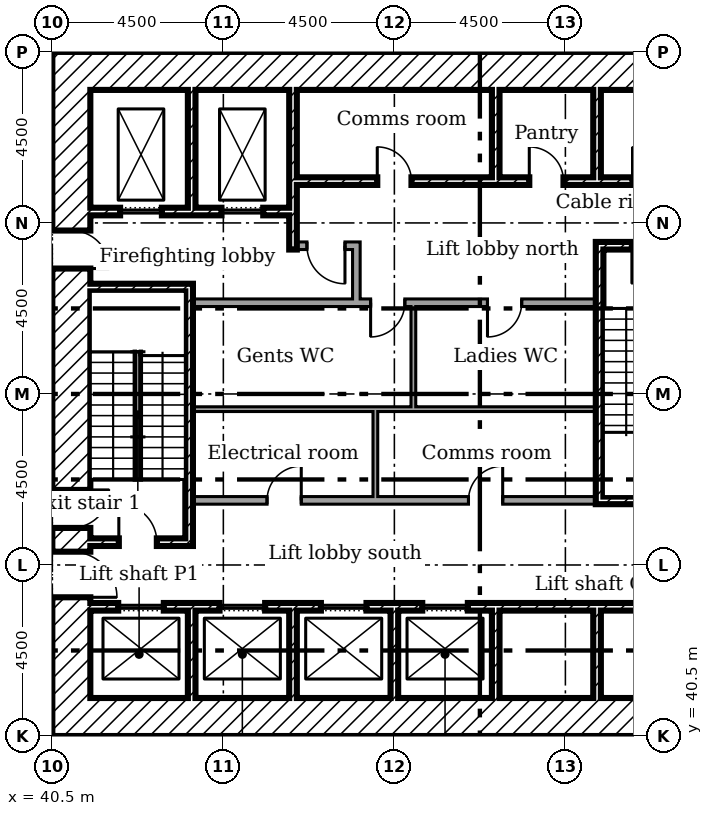
"""IFC4 building model, lengths in metres.
Left out: names, types, materials, properties, quantities, classifications, styles, units other than length and angle.
Written with IfcOpenShell. Run it as: python <this file> out.ifc"""

import sys

from ifc_helpers import new_model, si_unit, direction, frame, frame_2d, origin, place, context, subcontext, project, spatial, rectangle, extrude, element, fill, save


model = new_model("IFC4")
c1 = context("Model", 3, precision=1e-05, world=origin(), true_north=direction((0.0, 1.0)))
c2 = subcontext(c1, "Body", "Model", "MODEL_VIEW")
j1 = project(units=[si_unit("LENGTHUNIT", "METRE"), si_unit("PLANEANGLEUNIT", "RADIAN")], contexts=[c1])
p1 = place(None, origin())
s1 = spatial("IfcSite", under=j1, at=p1, CompositionType="ELEMENT")
p2 = place(p1, origin())
s2 = spatial("IfcBuilding", under=s1, at=p2, CompositionType="ELEMENT")
p3 = place(p2, frame((0.0, 0.0, 16.5)))
s3 = spatial("IfcBuildingStorey", under=s2, at=p3, CompositionType="ELEMENT", Elevation=16.5)
for number, where in (
    (1, (41.5, 58.0, 0.0)),
    (2, (41.5, 41.0, 0.0)),
):
    element("IfcWall", number, at=place(p3, frame(where)), inside=s3, PredefinedType="SHEAR", context=c2, shape_type="SweptSolid", body=[
        extrude(rectangle(XDim=16.0, YDim=1.0, at=frame_2d((8.0, 0.0))), origin(), (0.0, 0.0, 1.0), 4.0),
    ])
p4 = place(p3, frame((41.0, 40.5, 0.0), z_axis=(0.0, 0.0, 1.0), x_axis=(0.0, 1.0, 0.0)))
e3 = element("IfcWall", 3, at=p4, inside=s3, PredefinedType="SHEAR", context=c2, shape_type="SweptSolid", body=[
    extrude(rectangle(XDim=18.0, YDim=1.0, at=frame_2d((9.0, 0.0))), origin(), (0.0, 0.0, 1.0), 4.0),
])
p5 = place(p4, frame((3.65, 0.0, 0.0)))
e4 = element("IfcOpeningElement", 4, at=p5, cuts=e3, PredefinedType="OPENING", context=c2, shape_type="SweptSolid", body=[
    extrude(rectangle(XDim=1.2, YDim=2.1, at=frame_2d((0.6, 1.05))), frame((0.0, 0.51, 0.0), z_axis=(0.0, -1.0, 0.0), x_axis=(1.0, 0.0, 0.0)), (0.0, 0.0, 1.0), 1.02),
])
p6 = place(p4, frame((5.475, 0.0, 0.0)))
e5 = element("IfcOpeningElement", 5, at=p6, cuts=e3, PredefinedType="OPENING", context=c2, shape_type="SweptSolid", body=[
    extrude(rectangle(XDim=1.0, YDim=2.1, at=frame_2d((0.5, 1.05))), frame((0.0, 0.51, 0.0), z_axis=(0.0, -1.0, 0.0), x_axis=(1.0, 0.0, 0.0)), (0.0, 0.0, 1.0), 1.02),
])
p7 = place(p4, frame((12.3, 0.0, 0.0)))
e6 = element("IfcOpeningElement", 6, at=p7, cuts=e3, PredefinedType="OPENING", context=c2, shape_type="SweptSolid", body=[
    extrude(rectangle(XDim=1.0, YDim=2.1, at=frame_2d((0.5, 1.05))), frame((0.0, 0.51, 0.0), z_axis=(0.0, -1.0, 0.0), x_axis=(1.0, 0.0, 0.0)), (0.0, 0.0, 1.0), 1.02),
])
p8 = place(p3, frame((44.167, 57.5, 0.0), z_axis=(0.0, 0.0, 1.0), x_axis=(0.0, -1.0, 0.0)))
e7 = element("IfcWall", 7, at=p8, inside=s3, PredefinedType="SHEAR", context=c2, shape_type="SweptSolid", body=[
    extrude(rectangle(XDim=3.1, YDim=0.2, at=frame_2d((1.55, 0.0))), origin(), (0.0, 0.0, 1.0), 4.0),
])
p9 = place(p3, frame((46.833, 57.5, 0.0), z_axis=(0.0, 0.0, 1.0), x_axis=(0.0, -1.0, 0.0)))
e8 = element("IfcWall", 8, at=p9, inside=s3, PredefinedType="SHEAR", context=c2, shape_type="SweptSolid", body=[
    extrude(rectangle(XDim=4.2, YDim=0.2, at=frame_2d((2.1, 0.0))), origin(), (0.0, 0.0, 1.0), 4.0),
])
for number, where, z_axis, x_axis in (
    (9, (52.167, 57.5, 0.0), (0.0, 0.0, 1.0), (0.0, -1.0, 0.0)),
    (10, (54.833, 57.5, 0.0), (0.0, 0.0, 1.0), (0.0, -1.0, 0.0)),
    (11, (44.167, 41.5, 0.0), (0.0, 0.0, 1.0), (0.0, 1.0, 0.0)),
    (12, (46.833, 41.5, 0.0), (0.0, 0.0, 1.0), (0.0, 1.0, 0.0)),
    (13, (49.5, 41.5, 0.0), (0.0, 0.0, 1.0), (0.0, 1.0, 0.0)),
    (14, (52.167, 41.5, 0.0), (0.0, 0.0, 1.0), (0.0, 1.0, 0.0)),
    (15, (54.833, 41.5, 0.0), (0.0, 0.0, 1.0), (0.0, 1.0, 0.0)),
):
    element("IfcWall", number, at=place(p3, frame(where, z_axis=z_axis, x_axis=x_axis)), inside=s3, PredefinedType="SHEAR", context=c2, shape_type="SweptSolid", body=[
        extrude(rectangle(XDim=2.3, YDim=0.2, at=frame_2d((1.15, 0.0))), origin(), (0.0, 0.0, 1.0), 4.0),
    ])
p10 = place(p3, frame((48.5, 51.9, 0.0), z_axis=(0.0, 0.0, 1.0), x_axis=(0.0, 1.0, 0.0)))
e16 = element("IfcWall", 16, at=p10, inside=s3, PredefinedType="PARTITIONING", context=c2, shape_type="SweptSolid", body=[
    extrude(rectangle(XDim=1.6, YDim=0.2, at=frame_2d((0.8, 0.0))), origin(), (0.0, 0.0, 1.0), 4.0),
])
p11 = place(p3, frame((46.933, 53.4, 0.0)))
e17 = element("IfcWall", 17, at=p11, inside=s3, PredefinedType="PARTITIONING", context=c2, shape_type="SweptSolid", body=[
    extrude(rectangle(XDim=1.467, YDim=0.2, at=frame_2d((0.733, 0.0))), origin(), (0.0, 0.0, 1.0), 4.0),
])
p12 = place(p11, frame((0.267, 0.0, 0.0)))
e18 = element("IfcOpeningElement", 18, at=p12, cuts=e17, PredefinedType="OPENING", context=c2, shape_type="SweptSolid", body=[
    extrude(rectangle(XDim=1.0, YDim=2.1, at=frame_2d((0.5, 1.05))), frame((0.0, 0.11, 0.0), z_axis=(0.0, -1.0, 0.0), x_axis=(1.0, 0.0, 0.0)), (0.0, 0.0, 1.0), 0.22),
])
p13 = place(p3, frame((46.933, 55.1, 0.0)))
e19 = element("IfcWall", 19, at=p13, inside=s3, PredefinedType="SHEAR", context=c2, shape_type="SweptSolid", body=[
    extrude(rectangle(XDim=10.567, YDim=0.2, at=frame_2d((5.283, 0.0))), origin(), (0.0, 0.0, 1.0), 4.0),
])
p14 = place(p13, frame((8.833, 0.0, 0.0)))
e20 = element("IfcOpeningElement", 20, at=p14, cuts=e19, PredefinedType="OPENING", context=c2, shape_type="SweptSolid", body=[
    extrude(rectangle(XDim=0.9, YDim=2.1, at=frame_2d((0.45, 1.05))), frame((0.0, 0.11, 0.0), z_axis=(0.0, -1.0, 0.0), x_axis=(1.0, 0.0, 0.0)), (0.0, 0.0, 1.0), 0.22),
])
p15 = place(p13, frame((2.117, 0.0, 0.0)))
e21 = element("IfcOpeningElement", 21, at=p15, cuts=e19, PredefinedType="OPENING", context=c2, shape_type="SweptSolid", body=[
    extrude(rectangle(XDim=0.9, YDim=2.1, at=frame_2d((0.45, 1.05))), frame((0.0, 0.11, 0.0), z_axis=(0.0, -1.0, 0.0), x_axis=(1.0, 0.0, 0.0)), (0.0, 0.0, 1.0), 0.22),
])
p16 = place(p13, frame((6.117, 0.0, 0.0)))
e22 = element("IfcOpeningElement", 22, at=p16, cuts=e19, PredefinedType="OPENING", context=c2, shape_type="SweptSolid", body=[
    extrude(rectangle(XDim=0.9, YDim=2.1, at=frame_2d((0.45, 1.05))), frame((0.0, 0.11, 0.0), z_axis=(0.0, -1.0, 0.0), x_axis=(1.0, 0.0, 0.0)), (0.0, 0.0, 1.0), 0.22),
])
p17 = place(p3, frame((41.5, 54.3, 0.0)))
e23 = element("IfcWall", 23, at=p17, inside=s3, PredefinedType="SHEAR", context=c2, shape_type="SweptSolid", body=[
    extrude(rectangle(XDim=5.233, YDim=0.2, at=frame_2d((2.617, 0.0))), origin(), (0.0, 0.0, 1.0), 4.0),
])
p18 = place(p17, frame((0.783, 0.0, 0.0)))
e24 = element("IfcOpeningElement", 24, at=p18, cuts=e23, PredefinedType="OPENING", context=c2, shape_type="SweptSolid", body=[
    extrude(rectangle(XDim=1.1, YDim=2.1, at=frame_2d((0.55, 1.05))), frame((0.0, 0.11, 0.0), z_axis=(0.0, -1.0, 0.0), x_axis=(1.0, 0.0, 0.0)), (0.0, 0.0, 1.0), 0.22),
])
p19 = place(p17, frame((3.45, 0.0, 0.0)))
e25 = element("IfcOpeningElement", 25, at=p19, cuts=e23, PredefinedType="OPENING", context=c2, shape_type="SweptSolid", body=[
    extrude(rectangle(XDim=1.1, YDim=2.1, at=frame_2d((0.55, 1.05))), frame((0.0, 0.11, 0.0), z_axis=(0.0, -1.0, 0.0), x_axis=(1.0, 0.0, 0.0)), (0.0, 0.0, 1.0), 0.22),
])
p20 = place(p3, frame((41.5, 43.9, 0.0)))
e26 = element("IfcWall", 26, at=p20, inside=s3, PredefinedType="SHEAR", context=c2, shape_type="SweptSolid", body=[
    extrude(rectangle(XDim=16.0, YDim=0.2, at=frame_2d((8.0, 0.0))), origin(), (0.0, 0.0, 1.0), 4.0),
])
p21 = place(p20, frame((0.733, 0.0, 0.0)))
e27 = element("IfcOpeningElement", 27, at=p21, cuts=e26, PredefinedType="OPENING", context=c2, shape_type="SweptSolid", body=[
    extrude(rectangle(XDim=1.2, YDim=2.1, at=frame_2d((0.6, 1.05))), frame((0.0, 0.11, 0.0), z_axis=(0.0, -1.0, 0.0), x_axis=(1.0, 0.0, 0.0)), (0.0, 0.0, 1.0), 0.22),
])
p22 = place(p20, frame((3.4, 0.0, 0.0)))
e28 = element("IfcOpeningElement", 28, at=p22, cuts=e26, PredefinedType="OPENING", context=c2, shape_type="SweptSolid", body=[
    extrude(rectangle(XDim=1.2, YDim=2.1, at=frame_2d((0.6, 1.05))), frame((0.0, 0.11, 0.0), z_axis=(0.0, -1.0, 0.0), x_axis=(1.0, 0.0, 0.0)), (0.0, 0.0, 1.0), 0.22),
])
p23 = place(p20, frame((6.067, 0.0, 0.0)))
e29 = element("IfcOpeningElement", 29, at=p23, cuts=e26, PredefinedType="OPENING", context=c2, shape_type="SweptSolid", body=[
    extrude(rectangle(XDim=1.2, YDim=2.1, at=frame_2d((0.6, 1.05))), frame((0.0, 0.11, 0.0), z_axis=(0.0, -1.0, 0.0), x_axis=(1.0, 0.0, 0.0)), (0.0, 0.0, 1.0), 0.22),
])
p24 = place(p20, frame((8.733, 0.0, 0.0)))
e30 = element("IfcOpeningElement", 30, at=p24, cuts=e26, PredefinedType="OPENING", context=c2, shape_type="SweptSolid", body=[
    extrude(rectangle(XDim=1.2, YDim=2.1, at=frame_2d((0.6, 1.05))), frame((0.0, 0.11, 0.0), z_axis=(0.0, -1.0, 0.0), x_axis=(1.0, 0.0, 0.0)), (0.0, 0.0, 1.0), 0.22),
])
p25 = place(p3, frame((44.1, 45.5, 0.0), z_axis=(0.0, 0.0, 1.0), x_axis=(0.0, 1.0, 0.0)))
e31 = element("IfcWall", 31, at=p25, inside=s3, PredefinedType="SHEAR", context=c2, shape_type="SweptSolid", body=[
    extrude(rectangle(XDim=6.9, YDim=0.2, at=frame_2d((3.45, 0.0))), origin(), (0.0, 0.0, 1.0), 4.0),
])
p26 = place(p3, frame((41.5, 52.3, 0.0)))
e32 = element("IfcWall", 32, at=p26, inside=s3, PredefinedType="SHEAR", context=c2, shape_type="SweptSolid", body=[
    extrude(rectangle(XDim=2.5, YDim=0.2, at=frame_2d((1.25, 0.0))), origin(), (0.0, 0.0, 1.0), 4.0),
])
p27 = place(p3, frame((41.5, 45.6, 0.0)))
e33 = element("IfcWall", 33, at=p27, inside=s3, PredefinedType="SHEAR", context=c2, shape_type="SweptSolid", body=[
    extrude(rectangle(XDim=2.5, YDim=0.2, at=frame_2d((1.25, 0.0))), origin(), (0.0, 0.0, 1.0), 4.0),
])
p28 = place(p27, frame((0.75, 0.0, 0.0)))
e34 = element("IfcOpeningElement", 34, at=p28, cuts=e33, PredefinedType="OPENING", context=c2, shape_type="SweptSolid", body=[
    extrude(rectangle(XDim=1.0, YDim=2.1, at=frame_2d((0.5, 1.05))), frame((0.0, 0.11, 0.0), z_axis=(0.0, -1.0, 0.0), x_axis=(1.0, 0.0, 0.0)), (0.0, 0.0, 1.0), 0.22),
])
p29 = place(p3, frame((54.8, 53.4, 0.0)))
e35 = element("IfcWall", 35, at=p29, inside=s3, PredefinedType="SHEAR", context=c2, shape_type="SweptSolid", body=[
    extrude(rectangle(XDim=2.7, YDim=0.2, at=frame_2d((1.35, 0.0))), origin(), (0.0, 0.0, 1.0), 4.0),
])
p30 = place(p29, frame((0.95, 0.0, 0.0)))
e36 = element("IfcOpeningElement", 36, at=p30, cuts=e35, PredefinedType="OPENING", context=c2, shape_type="SweptSolid", body=[
    extrude(rectangle(XDim=1.0, YDim=2.1, at=frame_2d((0.5, 1.05))), frame((0.0, 0.11, 0.0), z_axis=(0.0, -1.0, 0.0), x_axis=(1.0, 0.0, 0.0)), (0.0, 0.0, 1.0), 0.22),
])
p31 = place(p3, frame((54.8, 46.7, 0.0)))
e37 = element("IfcWall", 37, at=p31, inside=s3, PredefinedType="SHEAR", context=c2, shape_type="SweptSolid", body=[
    extrude(rectangle(XDim=2.7, YDim=0.2, at=frame_2d((1.35, 0.0))), origin(), (0.0, 0.0, 1.0), 4.0),
])
p32 = place(p3, frame((54.9, 46.8, 0.0), z_axis=(0.0, 0.0, 1.0), x_axis=(0.0, 1.0, 0.0)))
e38 = element("IfcWall", 38, at=p32, inside=s3, PredefinedType="SHEAR", context=c2, shape_type="SweptSolid", body=[
    extrude(rectangle(XDim=6.5, YDim=0.2, at=frame_2d((3.25, 0.0))), origin(), (0.0, 0.0, 1.0), 4.0),
])
p33 = place(p3, frame((44.2, 51.9, 0.0)))
e39 = element("IfcWall", 39, at=p33, inside=s3, PredefinedType="PARTITIONING", context=c2, shape_type="SweptSolid", body=[
    extrude(rectangle(XDim=10.6, YDim=0.2, at=frame_2d((5.3, 0.0))), origin(), (0.0, 0.0, 1.0), 4.0),
])
p34 = place(p33, frame((4.675, 0.0, 0.0)))
e40 = element("IfcOpeningElement", 40, at=p34, cuts=e39, PredefinedType="OPENING", context=c2, shape_type="SweptSolid", body=[
    extrude(rectangle(XDim=0.9, YDim=2.1, at=frame_2d((0.45, 1.05))), frame((0.0, 0.11, 0.0), z_axis=(0.0, -1.0, 0.0), x_axis=(1.0, 0.0, 0.0)), (0.0, 0.0, 1.0), 0.22),
])
p35 = place(p33, frame((7.75, 0.0, 0.0)))
e41 = element("IfcOpeningElement", 41, at=p35, cuts=e39, PredefinedType="OPENING", context=c2, shape_type="SweptSolid", body=[
    extrude(rectangle(XDim=0.9, YDim=2.1, at=frame_2d((0.45, 1.05))), frame((0.0, 0.11, 0.0), z_axis=(0.0, -1.0, 0.0), x_axis=(1.0, 0.0, 0.0)), (0.0, 0.0, 1.0), 0.22),
])
p36 = place(p3, frame((44.2, 46.7, 0.0)))
e42 = element("IfcWall", 42, at=p36, inside=s3, PredefinedType="PARTITIONING", context=c2, shape_type="SweptSolid", body=[
    extrude(rectangle(XDim=10.6, YDim=0.2, at=frame_2d((5.3, 0.0))), origin(), (0.0, 0.0, 1.0), 4.0),
])
p37 = place(p36, frame((1.95, 0.0, 0.0)))
e43 = element("IfcOpeningElement", 43, at=p37, cuts=e42, PredefinedType="OPENING", context=c2, shape_type="SweptSolid", body=[
    extrude(rectangle(XDim=0.9, YDim=2.1, at=frame_2d((0.45, 1.05))), frame((0.0, 0.11, 0.0), z_axis=(0.0, -1.0, 0.0), x_axis=(1.0, 0.0, 0.0)), (0.0, 0.0, 1.0), 0.22),
])
p38 = place(p36, frame((7.25, 0.0, 0.0)))
e44 = element("IfcOpeningElement", 44, at=p38, cuts=e42, PredefinedType="OPENING", context=c2, shape_type="SweptSolid", body=[
    extrude(rectangle(XDim=0.9, YDim=2.1, at=frame_2d((0.45, 1.05))), frame((0.0, 0.11, 0.0), z_axis=(0.0, -1.0, 0.0), x_axis=(1.0, 0.0, 0.0)), (0.0, 0.0, 1.0), 0.22),
])
p39 = place(p3, frame((49.0, 46.8, 0.0), z_axis=(0.0, 0.0, 1.0), x_axis=(0.0, 1.0, 0.0)))
e45 = element("IfcWall", 45, at=p39, inside=s3, PredefinedType="PARTITIONING", context=c2, shape_type="SweptSolid", body=[
    extrude(rectangle(XDim=2.363, YDim=0.125, at=frame_2d((1.181, 0.0))), origin(), (0.0, 0.0, 1.0), 4.0),
])
p40 = place(p3, frame((49.0, 49.1, 0.0), z_axis=(0.0, 0.0, 1.0), x_axis=(-1.0, 0.0, 0.0)))
e46 = element("IfcWall", 46, at=p40, inside=s3, PredefinedType="PARTITIONING", context=c2, shape_type="SweptSolid", body=[
    extrude(rectangle(XDim=4.8, YDim=0.125, at=frame_2d((2.4, 0.0))), origin(), (0.0, 0.0, 1.0), 4.0),
])
p41 = place(p3, frame((50.062, 49.1, 0.0), z_axis=(0.0, 0.0, 1.0), x_axis=(-1.0, 0.0, 0.0)))
e47 = element("IfcWall", 47, at=p41, inside=s3, PredefinedType="PARTITIONING", context=c2, shape_type="SweptSolid", body=[
    extrude(rectangle(XDim=1.0, YDim=0.125, at=frame_2d((0.5, 0.0))), origin(), (0.0, 0.0, 1.0), 4.0),
])
p42 = place(p3, frame((54.8, 49.1, 0.0), z_axis=(0.0, 0.0, 1.0), x_axis=(-1.0, 0.0, 0.0)))
e48 = element("IfcWall", 48, at=p42, inside=s3, PredefinedType="PARTITIONING", context=c2, shape_type="SweptSolid", body=[
    extrude(rectangle(XDim=4.8, YDim=0.125, at=frame_2d((2.4, 0.0))), origin(), (0.0, 0.0, 1.0), 4.0),
])
p43 = place(p3, frame((50.0, 49.163, 0.0), z_axis=(0.0, 0.0, 1.0), x_axis=(0.0, 1.0, 0.0)))
e49 = element("IfcWall", 49, at=p43, inside=s3, PredefinedType="PARTITIONING", context=c2, shape_type="SweptSolid", body=[
    extrude(rectangle(XDim=2.637, YDim=0.125, at=frame_2d((1.319, 0.0))), origin(), (0.0, 0.0, 1.0), 4.0),
])
p44 = place(p5, frame((1.2, 0.0, 0.0), x_axis=(-1.0, 0.0, 0.0)))
e50 = element("IfcDoor", 50, at=p44, inside=s3, OperationType="SINGLE_SWING_LEFT", PredefinedType="DOOR", context=c2, shape_type="SweptSolid", body=[
    extrude(rectangle(XDim=1.2, YDim=2.1, at=frame_2d((0.6, 1.05))), frame((0.0, 0.025, 0.0), z_axis=(0.0, -1.0, 0.0), x_axis=(1.0, 0.0, 0.0)), (0.0, 0.0, 1.0), 0.05),
])
fill(e4, e50)
p45 = place(p28, origin())
e51 = element("IfcDoor", 51, at=p45, inside=s3, OperationType="SINGLE_SWING_RIGHT", PredefinedType="DOOR", context=c2, shape_type="SweptSolid", body=[
    extrude(rectangle(XDim=1.0, YDim=2.1, at=frame_2d((0.5, 1.05))), frame((0.0, 0.025, 0.0), z_axis=(0.0, -1.0, 0.0), x_axis=(1.0, 0.0, 0.0)), (0.0, 0.0, 1.0), 0.05),
])
fill(e34, e51)
p46 = place(p6, frame((1.0, 0.0, 0.0), x_axis=(-1.0, 0.0, 0.0)))
e52 = element("IfcDoor", 52, at=p46, inside=s3, OperationType="SINGLE_SWING_RIGHT", PredefinedType="DOOR", context=c2, shape_type="SweptSolid", body=[
    extrude(rectangle(XDim=1.0, YDim=2.1, at=frame_2d((0.5, 1.05))), frame((0.0, 0.025, 0.0), z_axis=(0.0, -1.0, 0.0), x_axis=(1.0, 0.0, 0.0)), (0.0, 0.0, 1.0), 0.05),
])
fill(e5, e52)
p47 = place(p30, frame((1.0, 0.0, 0.0), x_axis=(-1.0, 0.0, 0.0)))
e53 = element("IfcDoor", 53, at=p47, inside=s3, OperationType="SINGLE_SWING_LEFT", PredefinedType="DOOR", context=c2, shape_type="SweptSolid", body=[
    extrude(rectangle(XDim=1.0, YDim=2.1, at=frame_2d((0.5, 1.05))), frame((0.0, 0.025, 0.0), z_axis=(0.0, -1.0, 0.0), x_axis=(1.0, 0.0, 0.0)), (0.0, 0.0, 1.0), 0.05),
])
fill(e36, e53)
p48 = place(p12, frame((1.0, 0.0, 0.0), x_axis=(-1.0, 0.0, 0.0)))
e54 = element("IfcDoor", 54, at=p48, inside=s3, OperationType="SINGLE_SWING_RIGHT", PredefinedType="DOOR", context=c2, shape_type="SweptSolid", body=[
    extrude(rectangle(XDim=1.0, YDim=2.1, at=frame_2d((0.5, 1.05))), frame((0.0, 0.025, 0.0), z_axis=(0.0, -1.0, 0.0), x_axis=(1.0, 0.0, 0.0)), (0.0, 0.0, 1.0), 0.05),
])
fill(e18, e54)
p49 = place(p7, frame((1.0, 0.0, 0.0), x_axis=(-1.0, 0.0, 0.0)))
e55 = element("IfcDoor", 55, at=p49, inside=s3, OperationType="SINGLE_SWING_LEFT", PredefinedType="DOOR", context=c2, shape_type="SweptSolid", body=[
    extrude(rectangle(XDim=1.0, YDim=2.1, at=frame_2d((0.5, 1.05))), frame((0.0, 0.025, 0.0), z_axis=(0.0, -1.0, 0.0), x_axis=(1.0, 0.0, 0.0)), (0.0, 0.0, 1.0), 0.05),
])
fill(e6, e55)
p50 = place(p14, origin())
e56 = element("IfcDoor", 56, at=p50, inside=s3, OperationType="SINGLE_SWING_RIGHT", PredefinedType="DOOR", context=c2, shape_type="SweptSolid", body=[
    extrude(rectangle(XDim=0.9, YDim=2.1, at=frame_2d((0.45, 1.05))), frame((0.0, 0.025, 0.0), z_axis=(0.0, -1.0, 0.0), x_axis=(1.0, 0.0, 0.0)), (0.0, 0.0, 1.0), 0.05),
])
fill(e20, e56)
p51 = place(p15, origin())
e57 = element("IfcDoor", 57, at=p51, inside=s3, OperationType="SINGLE_SWING_RIGHT", PredefinedType="DOOR", context=c2, shape_type="SweptSolid", body=[
    extrude(rectangle(XDim=0.9, YDim=2.1, at=frame_2d((0.45, 1.05))), frame((0.0, 0.025, 0.0), z_axis=(0.0, -1.0, 0.0), x_axis=(1.0, 0.0, 0.0)), (0.0, 0.0, 1.0), 0.05),
])
fill(e21, e57)
p52 = place(p16, origin())
e58 = element("IfcDoor", 58, at=p52, inside=s3, OperationType="SINGLE_SWING_RIGHT", PredefinedType="DOOR", context=c2, shape_type="SweptSolid", body=[
    extrude(rectangle(XDim=0.9, YDim=2.1, at=frame_2d((0.45, 1.05))), frame((0.0, 0.025, 0.0), z_axis=(0.0, -1.0, 0.0), x_axis=(1.0, 0.0, 0.0)), (0.0, 0.0, 1.0), 0.05),
])
fill(e22, e58)
p53 = place(p37, origin())
e59 = element("IfcDoor", 59, at=p53, inside=s3, OperationType="SINGLE_SWING_LEFT", PredefinedType="DOOR", context=c2, shape_type="SweptSolid", body=[
    extrude(rectangle(XDim=0.9, YDim=2.1, at=frame_2d((0.45, 1.05))), frame((0.0, 0.025, 0.0), z_axis=(0.0, -1.0, 0.0), x_axis=(1.0, 0.0, 0.0)), (0.0, 0.0, 1.0), 0.05),
])
fill(e43, e59)
p54 = place(p38, origin())
e60 = element("IfcDoor", 60, at=p54, inside=s3, OperationType="SINGLE_SWING_LEFT", PredefinedType="DOOR", context=c2, shape_type="SweptSolid", body=[
    extrude(rectangle(XDim=0.9, YDim=2.1, at=frame_2d((0.45, 1.05))), frame((0.0, 0.025, 0.0), z_axis=(0.0, -1.0, 0.0), x_axis=(1.0, 0.0, 0.0)), (0.0, 0.0, 1.0), 0.05),
])
fill(e44, e60)
p55 = place(p34, frame((0.9, 0.0, 0.0), x_axis=(-1.0, 0.0, 0.0)))
e61 = element("IfcDoor", 61, at=p55, inside=s3, OperationType="SINGLE_SWING_LEFT", PredefinedType="DOOR", context=c2, shape_type="SweptSolid", body=[
    extrude(rectangle(XDim=0.9, YDim=2.1, at=frame_2d((0.45, 1.05))), frame((0.0, 0.025, 0.0), z_axis=(0.0, -1.0, 0.0), x_axis=(1.0, 0.0, 0.0)), (0.0, 0.0, 1.0), 0.05),
])
fill(e40, e61)
p56 = place(p35, frame((0.9, 0.0, 0.0), x_axis=(-1.0, 0.0, 0.0)))
e62 = element("IfcDoor", 62, at=p56, inside=s3, OperationType="SINGLE_SWING_LEFT", PredefinedType="DOOR", context=c2, shape_type="SweptSolid", body=[
    extrude(rectangle(XDim=0.9, YDim=2.1, at=frame_2d((0.45, 1.05))), frame((0.0, 0.025, 0.0), z_axis=(0.0, -1.0, 0.0), x_axis=(1.0, 0.0, 0.0)), (0.0, 0.0, 1.0), 0.05),
])
fill(e41, e62)
p57 = place(p18, origin())
e63 = element("IfcDoor", 63, at=p57, inside=s3, OperationType="SLIDING_TO_LEFT", PredefinedType="DOOR", context=c2, shape_type="SweptSolid", body=[
    extrude(rectangle(XDim=1.1, YDim=2.1, at=frame_2d((0.55, 1.05))), frame((0.0, 0.025, 0.0), z_axis=(0.0, -1.0, 0.0), x_axis=(1.0, 0.0, 0.0)), (0.0, 0.0, 1.0), 0.05),
])
fill(e24, e63)
p58 = place(p19, origin())
e64 = element("IfcDoor", 64, at=p58, inside=s3, OperationType="SLIDING_TO_LEFT", PredefinedType="DOOR", context=c2, shape_type="SweptSolid", body=[
    extrude(rectangle(XDim=1.1, YDim=2.1, at=frame_2d((0.55, 1.05))), frame((0.0, 0.025, 0.0), z_axis=(0.0, -1.0, 0.0), x_axis=(1.0, 0.0, 0.0)), (0.0, 0.0, 1.0), 0.05),
])
fill(e25, e64)
p59 = place(p21, origin())
e65 = element("IfcDoor", 65, at=p59, inside=s3, OperationType="SLIDING_TO_LEFT", PredefinedType="DOOR", context=c2, shape_type="SweptSolid", body=[
    extrude(rectangle(XDim=1.2, YDim=2.1, at=frame_2d((0.6, 1.05))), frame((0.0, 0.025, 0.0), z_axis=(0.0, -1.0, 0.0), x_axis=(1.0, 0.0, 0.0)), (0.0, 0.0, 1.0), 0.05),
])
fill(e27, e65)
p60 = place(p22, origin())
e66 = element("IfcDoor", 66, at=p60, inside=s3, OperationType="SLIDING_TO_LEFT", PredefinedType="DOOR", context=c2, shape_type="SweptSolid", body=[
    extrude(rectangle(XDim=1.2, YDim=2.1, at=frame_2d((0.6, 1.05))), frame((0.0, 0.025, 0.0), z_axis=(0.0, -1.0, 0.0), x_axis=(1.0, 0.0, 0.0)), (0.0, 0.0, 1.0), 0.05),
])
fill(e28, e66)
p61 = place(p23, origin())
e67 = element("IfcDoor", 67, at=p61, inside=s3, OperationType="SLIDING_TO_LEFT", PredefinedType="DOOR", context=c2, shape_type="SweptSolid", body=[
    extrude(rectangle(XDim=1.2, YDim=2.1, at=frame_2d((0.6, 1.05))), frame((0.0, 0.025, 0.0), z_axis=(0.0, -1.0, 0.0), x_axis=(1.0, 0.0, 0.0)), (0.0, 0.0, 1.0), 0.05),
])
fill(e29, e67)
p62 = place(p24, origin())
e68 = element("IfcDoor", 68, at=p62, inside=s3, OperationType="SLIDING_TO_LEFT", PredefinedType="DOOR", context=c2, shape_type="SweptSolid", body=[
    extrude(rectangle(XDim=1.2, YDim=2.1, at=frame_2d((0.6, 1.05))), frame((0.0, 0.025, 0.0), z_axis=(0.0, -1.0, 0.0), x_axis=(1.0, 0.0, 0.0)), (0.0, 0.0, 1.0), 0.05),
])
fill(e30, e68)
save(model, sys.argv[1])
